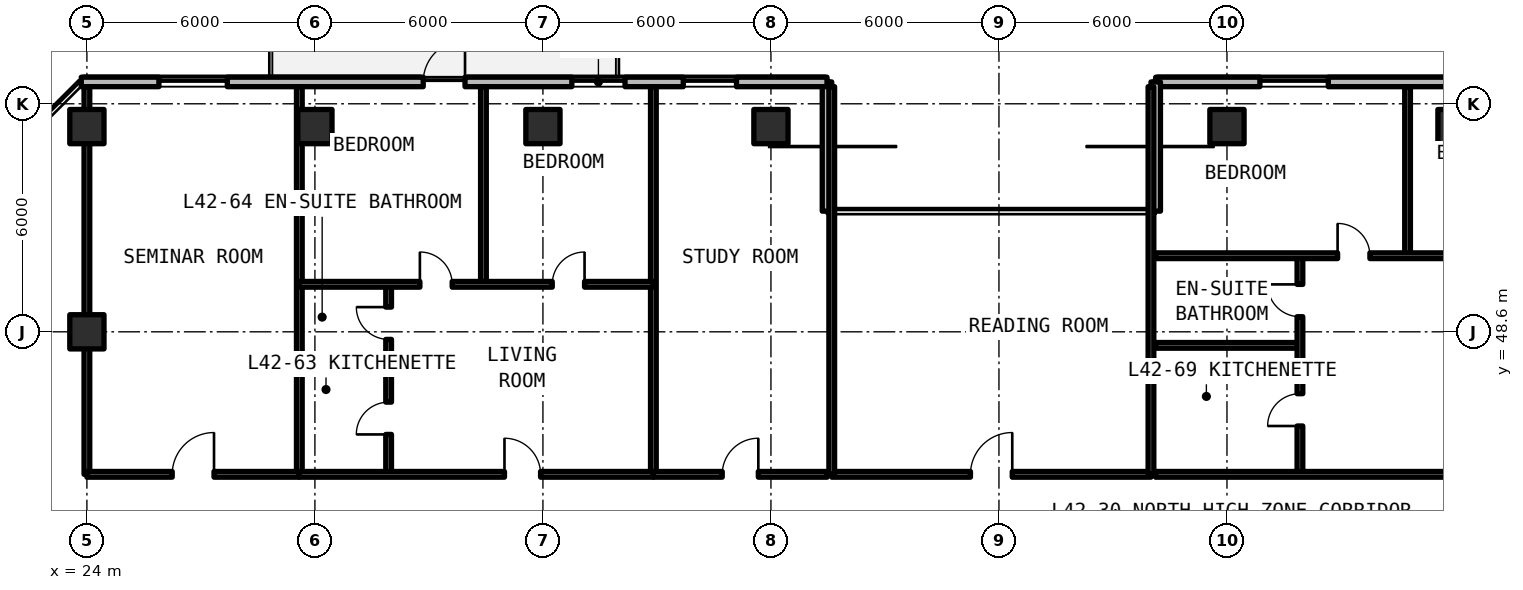
"""IFC4 building model, lengths in metres.
Left out: names, types, materials, properties, quantities, classifications, styles, units other than length and angle.
Written with IfcOpenShell. Run it as: python <this file> out.ifc"""

import sys

from ifc_helpers import new_model, si_unit, direction, frame, frame_2d, origin, origin_2d, place, context, subcontext, project, spatial, rectangle, extrude, element, fill, save


model = new_model("IFC4")
c1 = context("Model", 3, precision=1e-05, world=origin(), true_north=direction((0.0, 1.0)))
c2 = subcontext(c1, "Body", "Model", "MODEL_VIEW")
j1 = project(units=[si_unit("LENGTHUNIT", "METRE"), si_unit("PLANEANGLEUNIT", "RADIAN")], contexts=[c1])
p1 = place(None, origin())
s1 = spatial("IfcSite", under=j1, at=p1, CompositionType="ELEMENT")
p2 = place(p1, origin())
s2 = spatial("IfcBuilding", under=s1, at=p2, CompositionType="ELEMENT")
p3 = place(p2, frame((0.0, 0.0, 151.8)))
s3 = spatial("IfcBuildingStorey", under=s2, at=p3, CompositionType="ELEMENT", Elevation=151.8)
for number, where, z_axis, x_axis in (
    (1, (24.0, 48.6, 0.0), (0.0, 0.0, 1.0), (1.0, 0.0, 0.0)),
    (2, (24.0, 54.0, 0.0), (0.0, 0.0, 1.0), (1.0, 0.0, 0.0)),
    (3, (30.0, 54.0, 0.0), (0.0, 0.0, 1.0), (1.0, 0.0, 0.0)),
    (4, (36.0, 54.0, 0.0), (0.0, 0.0, 1.0), (1.0, 0.0, 0.0)),
    (5, (42.0, 54.0, 0.0), (0.0, 0.0, 1.0), (1.0, 0.0, 0.0)),
    (6, (54.0, 54.0, 0.0), (0.0, 0.0, 1.0), (1.0, 0.0, 0.0)),
    (7, (60.0, 54.0, 0.0), (0.0, 0.0, 1.0), (1.0, 0.0, 0.0)),
):
    element("IfcColumn", number, at=place(p3, frame(where, z_axis=z_axis, x_axis=x_axis)), inside=s3, PredefinedType="COLUMN", context=c2, shape_type="SweptSolid", body=[
        extrude(rectangle(XDim=0.9, YDim=0.9, at=origin_2d()), origin(), (0.0, 0.0, 1.0), 3.3),
    ])
p4 = place(p3, frame((95.748, 55.175, 0.0), z_axis=(0.0, 0.0, 1.0), x_axis=(-1.0, 0.0, 0.0)))
e8 = element("IfcWall", 8, at=p4, inside=s3, PredefinedType="SOLIDWALL", context=c2, shape_type="SweptSolid", body=[
    extrude(rectangle(XDim=43.623, YDim=0.25, at=frame_2d((21.812, 0.0))), origin(), (0.0, 0.0, 1.0), 3.08),
])
p5 = place(p4, frame((26.748, 0.0, 0.0)))
e9 = element("IfcOpeningElement", 9, at=p5, cuts=e8, PredefinedType="OPENING", context=c2, shape_type="SweptSolid", body=[
    extrude(rectangle(XDim=1.1, YDim=2.15, at=frame_2d((0.55, 1.075))), frame((0.0, 0.135, 0.0), z_axis=(0.0, -1.0, 0.0), x_axis=(1.0, 0.0, 0.0)), (0.0, 0.0, 1.0), 0.27),
])
p6 = place(p4, frame((14.898, 0.0, 0.0)))
e10 = element("IfcOpeningElement", 10, at=p6, cuts=e8, PredefinedType="OPENING", context=c2, shape_type="SweptSolid", body=[
    extrude(rectangle(XDim=1.1, YDim=2.15, at=frame_2d((0.55, 1.075))), frame((0.0, 0.135, 0.0), z_axis=(0.0, -1.0, 0.0), x_axis=(1.0, 0.0, 0.0)), (0.0, 0.0, 1.0), 0.27),
])
p7 = place(p4, frame((39.082, 0.0, 0.78)))
e11 = element("IfcOpeningElement", 11, at=p7, cuts=e8, PredefinedType="OPENING", context=c2, shape_type="SweptSolid", body=[
    extrude(rectangle(XDim=1.8, YDim=1.66, at=frame_2d((0.9, 0.83))), frame((0.0, 0.135, 0.0), z_axis=(0.0, -1.0, 0.0), x_axis=(1.0, 0.0, 0.0)), (0.0, 0.0, 1.0), 0.27),
])
p8 = place(p4, frame((33.045, 0.0, 0.78)))
e12 = element("IfcOpeningElement", 12, at=p8, cuts=e8, PredefinedType="OPENING", context=c2, shape_type="SweptSolid", body=[
    extrude(rectangle(XDim=1.8, YDim=1.66, at=frame_2d((0.9, 0.83))), frame((0.0, 0.135, 0.0), z_axis=(0.0, -1.0, 0.0), x_axis=(1.0, 0.0, 0.0)), (0.0, 0.0, 1.0), 0.27),
])
p9 = place(p4, frame((8.462, 0.0, 0.78)))
e13 = element("IfcOpeningElement", 13, at=p9, cuts=e8, PredefinedType="OPENING", context=c2, shape_type="SweptSolid", body=[
    extrude(rectangle(XDim=1.8, YDim=1.66, at=frame_2d((0.9, 0.83))), frame((0.0, 0.135, 0.0), z_axis=(0.0, -1.0, 0.0), x_axis=(1.0, 0.0, 0.0)), (0.0, 0.0, 1.0), 0.27),
])
p10 = place(p4, frame((2.25, 0.0, 0.78)))
e14 = element("IfcOpeningElement", 14, at=p10, cuts=e8, PredefinedType="OPENING", context=c2, shape_type="SweptSolid", body=[
    extrude(rectangle(XDim=1.8, YDim=1.66, at=frame_2d((0.9, 0.83))), frame((0.0, 0.135, 0.0), z_axis=(0.0, -1.0, 0.0), x_axis=(1.0, 0.0, 0.0)), (0.0, 0.0, 1.0), 0.27),
])
for number, where, z_axis, x_axis in (
    (15, (52.125, 55.175, 0.0), (0.0, 0.0, 1.0), (0.0, -1.0, 0.0)),
    (16, (43.475, 51.775, 0.0), (0.0, 0.0, 1.0), (0.0, 1.0, 0.0)),
):
    element("IfcWall", number, at=place(p3, frame(where, z_axis=z_axis, x_axis=x_axis)), inside=s3, PredefinedType="SOLIDWALL", context=c2, shape_type="SweptSolid", body=[
        extrude(rectangle(XDim=3.4, YDim=0.25, at=frame_2d((1.7, 0.0))), origin(), (0.0, 0.0, 1.0), 3.08),
    ])
p11 = place(p3, frame((43.475, 55.175, 0.0), z_axis=(0.0, 0.0, 1.0), x_axis=(-1.0, 0.0, 0.0)))
e17 = element("IfcWall", 17, at=p11, inside=s3, PredefinedType="SOLIDWALL", context=c2, shape_type="SweptSolid", body=[
    extrude(rectangle(XDim=19.623, YDim=0.25, at=frame_2d((9.812, 0.0))), origin(), (0.0, 0.0, 1.0), 3.08),
])
p12 = place(p11, frame((9.525, 0.0, 0.0)))
e18 = element("IfcOpeningElement", 18, at=p12, cuts=e17, PredefinedType="OPENING", context=c2, shape_type="SweptSolid", body=[
    extrude(rectangle(XDim=1.1, YDim=2.15, at=frame_2d((0.55, 1.075))), frame((0.0, 0.135, 0.0), z_axis=(0.0, -1.0, 0.0), x_axis=(1.0, 0.0, 0.0)), (0.0, 0.0, 1.0), 0.27),
])
p13 = place(p11, frame((15.78, 0.0, 0.78)))
e19 = element("IfcOpeningElement", 19, at=p13, cuts=e17, PredefinedType="OPENING", context=c2, shape_type="SweptSolid", body=[
    extrude(rectangle(XDim=1.8, YDim=1.66, at=frame_2d((0.9, 0.83))), frame((0.0, 0.135, 0.0), z_axis=(0.0, -1.0, 0.0), x_axis=(1.0, 0.0, 0.0)), (0.0, 0.0, 1.0), 0.27),
])
p14 = place(p11, frame((5.315, 0.0, 0.78)))
e20 = element("IfcOpeningElement", 20, at=p14, cuts=e17, PredefinedType="OPENING", context=c2, shape_type="SweptSolid", body=[
    extrude(rectangle(XDim=1.4, YDim=1.65, at=frame_2d((0.7, 0.825))), frame((0.0, 0.135, 0.0), z_axis=(0.0, -1.0, 0.0), x_axis=(1.0, 0.0, 0.0)), (0.0, 0.0, 1.0), 0.27),
])
p15 = place(p11, frame((2.382, 0.0, 0.78)))
e21 = element("IfcOpeningElement", 21, at=p15, cuts=e17, PredefinedType="OPENING", context=c2, shape_type="SweptSolid", body=[
    extrude(rectangle(XDim=1.4, YDim=1.65, at=frame_2d((0.7, 0.825))), frame((0.0, 0.135, 0.0), z_axis=(0.0, -1.0, 0.0), x_axis=(1.0, 0.0, 0.0)), (0.0, 0.0, 1.0), 0.27),
])
p16 = place(p3, frame((43.6, 44.85, 0.0), z_axis=(0.0, 0.0, 1.0), x_axis=(1.0, 0.0, 0.0)))
e22 = element("IfcWall", 22, at=p16, inside=s3, PredefinedType="SOLIDWALL", context=c2, shape_type="SweptSolid", body=[
    extrude(rectangle(XDim=8.4, YDim=0.15, at=frame_2d((4.2, 0.0))), origin(), (0.0, 0.0, 1.0), 2.35),
])
p17 = place(p16, frame((3.65, 0.0, 0.0)))
e23 = element("IfcOpeningElement", 23, at=p17, cuts=e22, PredefinedType="OPENING", context=c2, shape_type="SweptSolid", body=[
    extrude(rectangle(XDim=1.1, YDim=2.15, at=frame_2d((0.55, 1.075))), frame((0.0, 0.085, 0.0), z_axis=(0.0, -1.0, 0.0), x_axis=(1.0, 0.0, 0.0)), (0.0, 0.0, 1.0), 0.17),
])
for number, where, z_axis, x_axis in (
    (24, (43.6, 44.85, 0.0), (0.0, 0.0, 1.0), (0.0, 1.0, 0.0)),
    (25, (52.0, 44.85, 0.0), (0.0, 0.0, 1.0), (0.0, 1.0, 0.0)),
    (26, (24.0, 44.85, 0.0), (0.0, 0.0, 1.0), (0.0, 1.0, 0.0)),
    (27, (29.59, 44.85, 0.0), (0.0, 0.0, 1.0), (0.0, 1.0, 0.0)),
):
    element("IfcWall", number, at=place(p3, frame(where, z_axis=z_axis, x_axis=x_axis)), inside=s3, PredefinedType="SOLIDWALL", context=c2, shape_type="SweptSolid", body=[
        extrude(rectangle(XDim=10.2, YDim=0.15, at=frame_2d((5.1, 0.0))), origin(), (0.0, 0.0, 1.0), 2.35),
    ])
p18 = place(p3, frame((24.0, 44.85, 0.0), z_axis=(0.0, 0.0, 1.0), x_axis=(1.0, 0.0, 0.0)))
e28 = element("IfcWall", 28, at=p18, inside=s3, PredefinedType="SOLIDWALL", context=c2, shape_type="SweptSolid", body=[
    extrude(rectangle(XDim=5.59, YDim=0.15, at=frame_2d((2.795, 0.0))), origin(), (0.0, 0.0, 1.0), 2.35),
])
p19 = place(p18, frame((2.245, 0.0, 0.0)))
e29 = element("IfcOpeningElement", 29, at=p19, cuts=e28, PredefinedType="OPENING", context=c2, shape_type="SweptSolid", body=[
    extrude(rectangle(XDim=1.1, YDim=2.15, at=frame_2d((0.55, 1.075))), frame((0.0, 0.085, 0.0), z_axis=(0.0, -1.0, 0.0), x_axis=(1.0, 0.0, 0.0)), (0.0, 0.0, 1.0), 0.17),
])
p20 = place(p3, frame((38.906, 44.85, 0.0), z_axis=(0.0, 0.0, 1.0), x_axis=(0.0, 1.0, 0.0)))
e30 = element("IfcWall", 30, at=p20, inside=s3, PredefinedType="SOLIDWALL", context=c2, shape_type="SweptSolid", body=[
    extrude(rectangle(XDim=10.2, YDim=0.15, at=frame_2d((5.1, 0.0))), origin(), (0.0, 0.0, 1.0), 2.35),
])
p21 = place(p3, frame((29.59, 47.8, 0.0), z_axis=(0.0, 0.0, 1.0), x_axis=(1.0, 0.0, 0.0)))
e31 = element("IfcWall", 31, at=p21, inside=s3, PredefinedType="PARTITIONING", context=c2, shape_type="SweptSolid", body=[
    extrude(rectangle(XDim=2.35, YDim=0.15, at=frame_2d((1.175, 0.0))), origin(), (0.0, 0.0, 1.0), 2.35),
])
p22 = place(p3, frame((31.94, 44.85, 0.0), z_axis=(0.0, 0.0, 1.0), x_axis=(0.0, 1.0, 0.0)))
e32 = element("IfcWall", 32, at=p22, inside=s3, PredefinedType="PARTITIONING", context=c2, shape_type="SweptSolid", body=[
    extrude(rectangle(XDim=5.0, YDim=0.15, at=frame_2d((2.5, 0.0))), origin(), (0.0, 0.0, 1.0), 2.35),
])
p23 = place(p22, frame((1.05, 0.0, 0.0)))
e33 = element("IfcOpeningElement", 33, at=p23, cuts=e32, PredefinedType="OPENING", context=c2, shape_type="SweptSolid", body=[
    extrude(rectangle(XDim=0.85, YDim=2.1, at=frame_2d((0.425, 1.05))), frame((0.0, 0.085, 0.0), z_axis=(0.0, -1.0, 0.0), x_axis=(1.0, 0.0, 0.0)), (0.0, 0.0, 1.0), 0.17),
])
p24 = place(p22, frame((3.55, 0.0, 0.0)))
e34 = element("IfcOpeningElement", 34, at=p24, cuts=e32, PredefinedType="OPENING", context=c2, shape_type="SweptSolid", body=[
    extrude(rectangle(XDim=0.85, YDim=2.1, at=frame_2d((0.425, 1.05))), frame((0.0, 0.085, 0.0), z_axis=(0.0, -1.0, 0.0), x_axis=(1.0, 0.0, 0.0)), (0.0, 0.0, 1.0), 0.17),
])
p25 = place(p3, frame((34.435, 49.85, 0.0), z_axis=(0.0, 0.0, 1.0), x_axis=(0.0, 1.0, 0.0)))
e35 = element("IfcWall", 35, at=p25, inside=s3, PredefinedType="PARTITIONING", context=c2, shape_type="SweptSolid", body=[
    extrude(rectangle(XDim=5.2, YDim=0.15, at=frame_2d((2.6, 0.0))), origin(), (0.0, 0.0, 1.0), 2.35),
])
p26 = place(p3, frame((29.59, 49.85, 0.0), z_axis=(0.0, 0.0, 1.0), x_axis=(1.0, 0.0, 0.0)))
e36 = element("IfcWall", 36, at=p26, inside=s3, PredefinedType="PARTITIONING", context=c2, shape_type="SweptSolid", body=[
    extrude(rectangle(XDim=9.317, YDim=0.15, at=frame_2d((4.658, 0.0))), origin(), (0.0, 0.0, 1.0), 2.35),
])
p27 = place(p26, frame((3.172, 0.0, 0.0)))
e37 = element("IfcOpeningElement", 37, at=p27, cuts=e36, PredefinedType="OPENING", context=c2, shape_type="SweptSolid", body=[
    extrude(rectangle(XDim=0.85, YDim=2.1, at=frame_2d((0.425, 1.05))), frame((0.0, 0.085, 0.0), z_axis=(0.0, -1.0, 0.0), x_axis=(1.0, 0.0, 0.0)), (0.0, 0.0, 1.0), 0.17),
])
p28 = place(p26, frame((6.656, 0.0, 0.0)))
e38 = element("IfcOpeningElement", 38, at=p28, cuts=e36, PredefinedType="OPENING", context=c2, shape_type="SweptSolid", body=[
    extrude(rectangle(XDim=0.85, YDim=2.1, at=frame_2d((0.425, 1.05))), frame((0.0, 0.085, 0.0), z_axis=(0.0, -1.0, 0.0), x_axis=(1.0, 0.0, 0.0)), (0.0, 0.0, 1.0), 0.17),
])
p29 = place(p3, frame((29.59, 44.85, 0.0), z_axis=(0.0, 0.0, 1.0), x_axis=(1.0, 0.0, 0.0)))
e39 = element("IfcWall", 39, at=p29, inside=s3, PredefinedType="SOLIDWALL", context=c2, shape_type="SweptSolid", body=[
    extrude(rectangle(XDim=9.317, YDim=0.15, at=frame_2d((4.658, 0.0))), origin(), (0.0, 0.0, 1.0), 2.35),
])
p30 = place(p29, frame((5.398, 0.0, 0.0)))
e40 = element("IfcOpeningElement", 40, at=p30, cuts=e39, PredefinedType="OPENING", context=c2, shape_type="SweptSolid", body=[
    extrude(rectangle(XDim=0.95, YDim=2.15, at=frame_2d((0.475, 1.075))), frame((0.0, 0.085, 0.0), z_axis=(0.0, -1.0, 0.0), x_axis=(1.0, 0.0, 0.0)), (0.0, 0.0, 1.0), 0.17),
])
p31 = place(p3, frame((38.906, 44.85, 0.0), z_axis=(0.0, 0.0, 1.0), x_axis=(1.0, 0.0, 0.0)))
e41 = element("IfcWall", 41, at=p31, inside=s3, PredefinedType="SOLIDWALL", context=c2, shape_type="SweptSolid", body=[
    extrude(rectangle(XDim=4.573, YDim=0.15, at=frame_2d((2.287, 0.0))), origin(), (0.0, 0.0, 1.0), 2.35),
])
p32 = place(p31, frame((1.812, 0.0, 0.0)))
e42 = element("IfcOpeningElement", 42, at=p32, cuts=e41, PredefinedType="OPENING", context=c2, shape_type="SweptSolid", body=[
    extrude(rectangle(XDim=0.95, YDim=2.15, at=frame_2d((0.475, 1.075))), frame((0.0, 0.085, 0.0), z_axis=(0.0, -1.0, 0.0), x_axis=(1.0, 0.0, 0.0)), (0.0, 0.0, 1.0), 0.17),
])
p33 = place(p3, frame((52.12, 48.244, 0.0), z_axis=(0.0, 0.0, 1.0), x_axis=(1.0, 0.0, 0.0)))
e43 = element("IfcWall", 43, at=p33, inside=s3, PredefinedType="PARTITIONING", context=c2, shape_type="SweptSolid", body=[
    extrude(rectangle(XDim=3.8, YDim=0.15, at=frame_2d((1.9, 0.0))), origin(), (0.0, 0.0, 1.0), 2.35),
])
p34 = place(p3, frame((55.92, 44.85, 0.0), z_axis=(0.0, 0.0, 1.0), x_axis=(0.0, 1.0, 0.0)))
e44 = element("IfcWall", 44, at=p34, inside=s3, PredefinedType="PARTITIONING", context=c2, shape_type="SweptSolid", body=[
    extrude(rectangle(XDim=5.752, YDim=0.15, at=frame_2d((2.876, 0.0))), origin(), (0.0, 0.0, 1.0), 2.35),
])
p35 = place(p34, frame((1.272, 0.0, 0.0)))
e45 = element("IfcOpeningElement", 45, at=p35, cuts=e44, PredefinedType="OPENING", context=c2, shape_type="SweptSolid", body=[
    extrude(rectangle(XDim=0.85, YDim=2.1, at=frame_2d((0.425, 1.05))), frame((0.0, 0.085, 0.0), z_axis=(0.0, -1.0, 0.0), x_axis=(1.0, 0.0, 0.0)), (0.0, 0.0, 1.0), 0.17),
])
p36 = place(p34, frame((4.148, 0.0, 0.0)))
e46 = element("IfcOpeningElement", 46, at=p36, cuts=e44, PredefinedType="OPENING", context=c2, shape_type="SweptSolid", body=[
    extrude(rectangle(XDim=0.85, YDim=2.1, at=frame_2d((0.425, 1.05))), frame((0.0, 0.085, 0.0), z_axis=(0.0, -1.0, 0.0), x_axis=(1.0, 0.0, 0.0)), (0.0, 0.0, 1.0), 0.17),
])
p37 = place(p3, frame((58.752, 50.602, 0.0), z_axis=(0.0, 0.0, 1.0), x_axis=(0.0, 1.0, 0.0)))
e47 = element("IfcWall", 47, at=p37, inside=s3, PredefinedType="PARTITIONING", context=c2, shape_type="SweptSolid", body=[
    extrude(rectangle(XDim=4.448, YDim=0.15, at=frame_2d((2.224, 0.0))), origin(), (0.0, 0.0, 1.0), 2.35),
])
p38 = place(p3, frame((52.12, 50.602, 0.0), z_axis=(0.0, 0.0, 1.0), x_axis=(1.0, 0.0, 0.0)))
e48 = element("IfcWall", 48, at=p38, inside=s3, PredefinedType="PARTITIONING", context=c2, shape_type="SweptSolid", body=[
    extrude(rectangle(XDim=12.754, YDim=0.15, at=frame_2d((6.377, 0.0))), origin(), (0.0, 0.0, 1.0), 2.35),
])
p39 = place(p38, frame((4.791, 0.0, 0.0)))
e49 = element("IfcOpeningElement", 49, at=p39, cuts=e48, PredefinedType="OPENING", context=c2, shape_type="SweptSolid", body=[
    extrude(rectangle(XDim=0.85, YDim=2.1, at=frame_2d((0.425, 1.05))), frame((0.0, 0.085, 0.0), z_axis=(0.0, -1.0, 0.0), x_axis=(1.0, 0.0, 0.0)), (0.0, 0.0, 1.0), 0.17),
])
p40 = place(p38, frame((9.268, 0.0, 0.0)))
e50 = element("IfcOpeningElement", 50, at=p40, cuts=e48, PredefinedType="OPENING", context=c2, shape_type="SweptSolid", body=[
    extrude(rectangle(XDim=0.85, YDim=2.1, at=frame_2d((0.425, 1.05))), frame((0.0, 0.085, 0.0), z_axis=(0.0, -1.0, 0.0), x_axis=(1.0, 0.0, 0.0)), (0.0, 0.0, 1.0), 0.17),
])
p41 = place(p3, frame((52.12, 44.85, 0.0), z_axis=(0.0, 0.0, 1.0), x_axis=(1.0, 0.0, 0.0)))
e51 = element("IfcWall", 51, at=p41, inside=s3, PredefinedType="SOLIDWALL", context=c2, shape_type="SweptSolid", body=[
    extrude(rectangle(XDim=12.754, YDim=0.15, at=frame_2d((6.377, 0.0))), origin(), (0.0, 0.0, 1.0), 2.35),
])
p42 = place(p41, frame((7.842, 0.0, 0.0)))
e52 = element("IfcOpeningElement", 52, at=p42, cuts=e51, PredefinedType="OPENING", context=c2, shape_type="SweptSolid", body=[
    extrude(rectangle(XDim=0.95, YDim=2.15, at=frame_2d((0.475, 1.075))), frame((0.0, 0.085, 0.0), z_axis=(0.0, -1.0, 0.0), x_axis=(1.0, 0.0, 0.0)), (0.0, 0.0, 1.0), 0.17),
])
p43 = place(p7, origin())
e53 = element("IfcWindow", 53, at=p43, inside=s3, PartitioningType="SINGLE_PANEL", PredefinedType="WINDOW", context=c2, shape_type="SweptSolid", body=[
    extrude(rectangle(XDim=1.8, YDim=1.66, at=frame_2d((0.9, 0.83))), frame((0.0, 0.03, 0.0), z_axis=(0.0, -1.0, 0.0), x_axis=(1.0, 0.0, 0.0)), (0.0, 0.0, 1.0), 0.06),
])
fill(e11, e53)
p44 = place(p12, frame((1.1, 0.0, 0.0), z_axis=(0.0, 0.0, 1.0), x_axis=(-1.0, 0.0, 0.0)))
e54 = element("IfcDoor", 54, at=p44, inside=s3, OperationType="SINGLE_SWING_RIGHT", PredefinedType="DOOR", context=c2, shape_type="SweptSolid", body=[
    extrude(rectangle(XDim=1.1, YDim=2.15, at=frame_2d((0.55, 1.075))), frame((0.0, 0.025, 0.0), z_axis=(0.0, -1.0, 0.0), x_axis=(1.0, 0.0, 0.0)), (0.0, 0.0, 1.0), 0.05),
])
fill(e18, e54)
p45 = place(p13, origin())
e55 = element("IfcWindow", 55, at=p45, inside=s3, PartitioningType="SINGLE_PANEL", PredefinedType="WINDOW", context=c2, shape_type="SweptSolid", body=[
    extrude(rectangle(XDim=1.8, YDim=1.66, at=frame_2d((0.9, 0.83))), frame((0.0, 0.03, 0.0), z_axis=(0.0, -1.0, 0.0), x_axis=(1.0, 0.0, 0.0)), (0.0, 0.0, 1.0), 0.06),
])
fill(e19, e55)
p46 = place(p14, origin())
e56 = element("IfcWindow", 56, at=p46, inside=s3, PartitioningType="SINGLE_PANEL", PredefinedType="WINDOW", context=c2, shape_type="SweptSolid", body=[
    extrude(rectangle(XDim=1.4, YDim=1.65, at=frame_2d((0.7, 0.825))), frame((0.0, 0.03, 0.0), z_axis=(0.0, -1.0, 0.0), x_axis=(1.0, 0.0, 0.0)), (0.0, 0.0, 1.0), 0.06),
])
fill(e20, e56)
p47 = place(p15, origin())
e57 = element("IfcWindow", 57, at=p47, inside=s3, PartitioningType="SINGLE_PANEL", PredefinedType="WINDOW", context=c2, shape_type="SweptSolid", body=[
    extrude(rectangle(XDim=1.4, YDim=1.65, at=frame_2d((0.7, 0.825))), frame((0.0, 0.03, 0.0), z_axis=(0.0, -1.0, 0.0), x_axis=(1.0, 0.0, 0.0)), (0.0, 0.0, 1.0), 0.06),
])
fill(e21, e57)
p48 = place(p17, origin())
e58 = element("IfcDoor", 58, at=p48, inside=s3, OperationType="SINGLE_SWING_RIGHT", PredefinedType="DOOR", context=c2, shape_type="SweptSolid", body=[
    extrude(rectangle(XDim=1.1, YDim=2.15, at=frame_2d((0.55, 1.075))), frame((0.0, 0.025, 0.0), z_axis=(0.0, -1.0, 0.0), x_axis=(1.0, 0.0, 0.0)), (0.0, 0.0, 1.0), 0.05),
])
fill(e23, e58)
p49 = place(p19, origin())
e59 = element("IfcDoor", 59, at=p49, inside=s3, OperationType="SINGLE_SWING_RIGHT", PredefinedType="DOOR", context=c2, shape_type="SweptSolid", body=[
    extrude(rectangle(XDim=1.1, YDim=2.15, at=frame_2d((0.55, 1.075))), frame((0.0, 0.025, 0.0), z_axis=(0.0, -1.0, 0.0), x_axis=(1.0, 0.0, 0.0)), (0.0, 0.0, 1.0), 0.05),
])
fill(e29, e59)
p50 = place(p23, origin())
e60 = element("IfcDoor", 60, at=p50, inside=s3, OperationType="SINGLE_SWING_LEFT", PredefinedType="DOOR", context=c2, shape_type="SweptSolid", body=[
    extrude(rectangle(XDim=0.85, YDim=2.1, at=frame_2d((0.425, 1.05))), frame((0.0, 0.025, 0.0), z_axis=(0.0, -1.0, 0.0), x_axis=(1.0, 0.0, 0.0)), (0.0, 0.0, 1.0), 0.05),
])
fill(e33, e60)
p51 = place(p24, origin())
e61 = element("IfcDoor", 61, at=p51, inside=s3, OperationType="SINGLE_SWING_RIGHT", PredefinedType="DOOR", context=c2, shape_type="SweptSolid", body=[
    extrude(rectangle(XDim=0.85, YDim=2.1, at=frame_2d((0.425, 1.05))), frame((0.0, 0.025, 0.0), z_axis=(0.0, -1.0, 0.0), x_axis=(1.0, 0.0, 0.0)), (0.0, 0.0, 1.0), 0.05),
])
fill(e34, e61)
p52 = place(p27, origin())
e62 = element("IfcDoor", 62, at=p52, inside=s3, OperationType="SINGLE_SWING_LEFT", PredefinedType="DOOR", context=c2, shape_type="SweptSolid", body=[
    extrude(rectangle(XDim=0.85, YDim=2.1, at=frame_2d((0.425, 1.05))), frame((0.0, 0.025, 0.0), z_axis=(0.0, -1.0, 0.0), x_axis=(1.0, 0.0, 0.0)), (0.0, 0.0, 1.0), 0.05),
])
fill(e37, e62)
p53 = place(p28, origin())
e63 = element("IfcDoor", 63, at=p53, inside=s3, OperationType="SINGLE_SWING_RIGHT", PredefinedType="DOOR", context=c2, shape_type="SweptSolid", body=[
    extrude(rectangle(XDim=0.85, YDim=2.1, at=frame_2d((0.425, 1.05))), frame((0.0, 0.025, 0.0), z_axis=(0.0, -1.0, 0.0), x_axis=(1.0, 0.0, 0.0)), (0.0, 0.0, 1.0), 0.05),
])
fill(e38, e63)
p54 = place(p30, origin())
e64 = element("IfcDoor", 64, at=p54, inside=s3, OperationType="SINGLE_SWING_LEFT", PredefinedType="DOOR", context=c2, shape_type="SweptSolid", body=[
    extrude(rectangle(XDim=0.95, YDim=2.15, at=frame_2d((0.475, 1.075))), frame((0.0, 0.025, 0.0), z_axis=(0.0, -1.0, 0.0), x_axis=(1.0, 0.0, 0.0)), (0.0, 0.0, 1.0), 0.05),
])
fill(e40, e64)
p55 = place(p32, origin())
e65 = element("IfcDoor", 65, at=p55, inside=s3, OperationType="SINGLE_SWING_RIGHT", PredefinedType="DOOR", context=c2, shape_type="SweptSolid", body=[
    extrude(rectangle(XDim=0.95, YDim=2.15, at=frame_2d((0.475, 1.075))), frame((0.0, 0.025, 0.0), z_axis=(0.0, -1.0, 0.0), x_axis=(1.0, 0.0, 0.0)), (0.0, 0.0, 1.0), 0.05),
])
fill(e42, e65)
p56 = place(p35, origin())
e66 = element("IfcDoor", 66, at=p56, inside=s3, OperationType="SINGLE_SWING_LEFT", PredefinedType="DOOR", context=c2, shape_type="SweptSolid", body=[
    extrude(rectangle(XDim=0.85, YDim=2.1, at=frame_2d((0.425, 1.05))), frame((0.0, 0.025, 0.0), z_axis=(0.0, -1.0, 0.0), x_axis=(1.0, 0.0, 0.0)), (0.0, 0.0, 1.0), 0.05),
])
fill(e45, e66)
p57 = place(p36, origin())
e67 = element("IfcDoor", 67, at=p57, inside=s3, OperationType="SINGLE_SWING_RIGHT", PredefinedType="DOOR", context=c2, shape_type="SweptSolid", body=[
    extrude(rectangle(XDim=0.85, YDim=2.1, at=frame_2d((0.425, 1.05))), frame((0.0, 0.025, 0.0), z_axis=(0.0, -1.0, 0.0), x_axis=(1.0, 0.0, 0.0)), (0.0, 0.0, 1.0), 0.05),
])
fill(e46, e67)
p58 = place(p39, origin())
e68 = element("IfcDoor", 68, at=p58, inside=s3, OperationType="SINGLE_SWING_LEFT", PredefinedType="DOOR", context=c2, shape_type="SweptSolid", body=[
    extrude(rectangle(XDim=0.85, YDim=2.1, at=frame_2d((0.425, 1.05))), frame((0.0, 0.025, 0.0), z_axis=(0.0, -1.0, 0.0), x_axis=(1.0, 0.0, 0.0)), (0.0, 0.0, 1.0), 0.05),
])
fill(e49, e68)
save(model, sys.argv[1])
